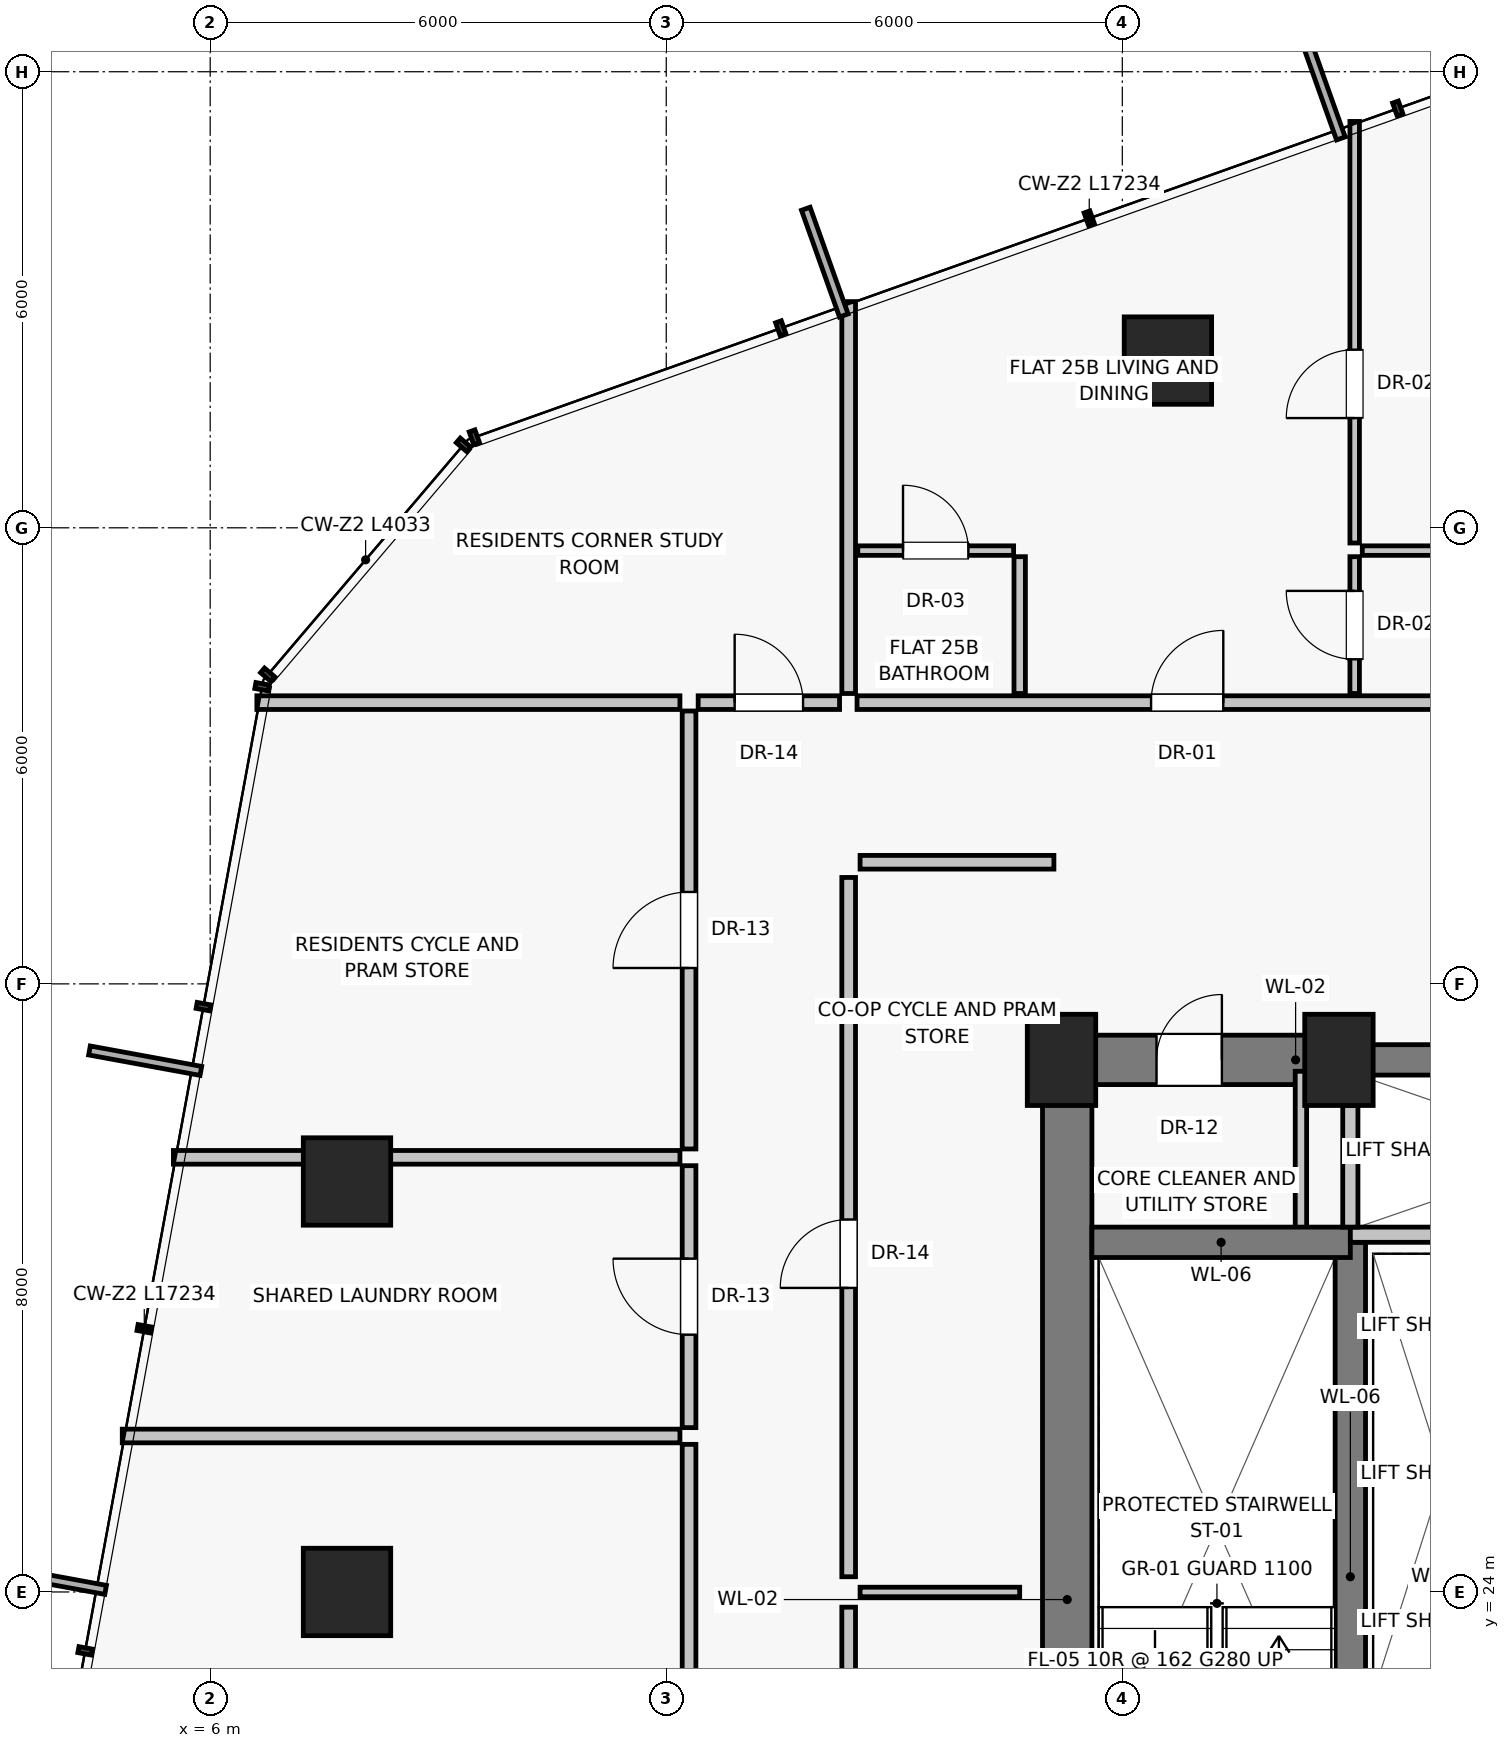
"""IFC4 building model, lengths in metres.
Left out: names, types, materials, properties, quantities, classifications, styles, units other than length and angle.
Written with IfcOpenShell. Run it as: python <this file> out.ifc"""

import sys

from ifc_helpers import new_model, si_unit, direction, frame, frame_2d, origin, origin_2d, place, context, subcontext, project, spatial, rectangle, extrude, source, transform, mapped, element, fill, save


model = new_model("IFC4")
c1 = context("Model", 3, precision=1e-05, world=origin(), true_north=direction((0.0, 1.0)))
c2 = subcontext(c1, "Body", "Model", "MODEL_VIEW")
j1 = project(units=[si_unit("LENGTHUNIT", "METRE"), si_unit("PLANEANGLEUNIT", "RADIAN")], contexts=[c1])
p1 = place(None, origin())
s1 = spatial("IfcSite", under=j1, at=p1, CompositionType="ELEMENT")
p2 = place(p1, origin())
s2 = spatial("IfcBuilding", under=s1, at=p2, CompositionType="ELEMENT")
p3 = place(p2, frame((0.0, 0.0, 92.7)))
s3 = spatial("IfcBuildingStorey", under=s2, at=p3, CompositionType="ELEMENT", Elevation=92.7)
for number, where, z_axis, x_axis in (
    (1, (17.2, 31.0, 0.0), (0.0, 0.0, 1.0), (1.0, 0.0, 0.0)),
    (2, (20.85, 31.0, 0.0), (0.0, 0.0, 1.0), (1.0, 0.0, 0.0)),
):
    element("IfcColumn", number, at=place(p3, frame(where, z_axis=z_axis, x_axis=x_axis)), inside=s3, PredefinedType="PILASTER", context=c2, shape_type="SweptSolid", body=[
        extrude(rectangle(XDim=0.9, YDim=1.2, at=origin_2d()), origin(), (0.0, 0.0, 1.0), 3.25),
    ])
for number, where, z_axis, x_axis in (
    (3, (18.6, 40.2, 0.0), (0.0, 0.0, 1.0), (1.0, 0.0, 0.0)),
    (4, (7.8, 29.4, 0.0), (0.0, 0.0, 1.0), (1.0, 0.0, 0.0)),
    (5, (7.8, 24.0, 0.0), (0.0, 0.0, 1.0), (1.0, 0.0, 0.0)),
):
    element("IfcColumn", number, at=place(p3, frame(where, z_axis=z_axis, x_axis=x_axis)), inside=s3, PredefinedType="COLUMN", context=c2, shape_type="SweptSolid", body=[
        extrude(rectangle(XDim=1.15, YDim=1.15, at=origin_2d()), origin(), (0.0, 0.0, 1.0), 3.25),
    ])
p4 = place(p3, frame((17.275, 16.8, 0.0), z_axis=(0.0, 0.0, 1.0), x_axis=(0.0, 1.0, 0.0)))
e6 = element("IfcWall", 6, at=p4, inside=s3, PredefinedType="SHEAR", context=c2, shape_type="SweptSolid", body=[
    extrude(rectangle(XDim=14.2, YDim=0.65, at=frame_2d((7.1, 0.0))), origin(), (0.0, 0.0, 1.0), 3.0),
])
p5 = place(p3, frame((17.2, 31.0, 0.0), z_axis=(0.0, 0.0, 1.0), x_axis=(1.0, 0.0, 0.0)))
e7 = element("IfcWall", 7, at=p5, inside=s3, PredefinedType="SHEAR", context=c2, shape_type="SweptSolid", body=[
    extrude(rectangle(XDim=3.8, YDim=0.65, at=frame_2d((1.9, 0.0))), origin(), (0.0, 0.0, 1.0), 3.0),
])
p6 = place(p5, frame((1.25, 0.0, 0.0)))
e8 = element("IfcOpeningElement", 8, at=p6, cuts=e7, PredefinedType="OPENING", context=c2, shape_type="SweptSolid", body=[
    extrude(rectangle(XDim=0.86, YDim=2.01, at=frame_2d((0.43, 1.005))), frame((0.0, 0.335, 0.0), z_axis=(0.0, -1.0, 0.0), x_axis=(1.0, 0.0, 0.0)), (0.0, 0.0, 1.0), 0.67),
])
p7 = place(p3, frame((21.0, 31.0, 0.0), z_axis=(0.0, 0.0, 1.0), x_axis=(1.0, 0.0, 0.0)))
e9 = element("IfcWall", 9, at=p7, inside=s3, PredefinedType="SHEAR", context=c2, shape_type="SweptSolid", body=[
    extrude(rectangle(XDim=6.0, YDim=0.4, at=frame_2d((3.0, 0.0))), origin(), (0.0, 0.0, 1.0), 3.0),
])
p8 = place(p3, frame((20.35, 28.65, 0.0), z_axis=(0.0, 0.0, 1.0), x_axis=(0.0, 1.0, 0.0)))
e10 = element("IfcWall", 10, at=p8, inside=s3, PredefinedType="PARTITIONING", context=c2, shape_type="SweptSolid", body=[
    extrude(rectangle(XDim=2.2, YDim=0.15, at=frame_2d((1.1, 0.0))), origin(), (0.0, 0.0, 1.0), 3.0),
])
p9 = place(p3, frame((21.0, 19.8, 0.0), z_axis=(0.0, 0.0, 1.0), x_axis=(0.0, 1.0, 0.0)))
e11 = element("IfcWall", 11, at=p9, inside=s3, PredefinedType="SHEAR", context=c2, shape_type="SweptSolid", body=[
    extrude(rectangle(XDim=8.8, YDim=0.4, at=frame_2d((4.4, 0.0))), origin(), (0.0, 0.0, 1.0), 3.0),
])
p10 = place(p3, frame((17.6, 28.6, 0.0), z_axis=(0.0, 0.0, 1.0), x_axis=(1.0, 0.0, 0.0)))
e12 = element("IfcWall", 12, at=p10, inside=s3, PredefinedType="SHEAR", context=c2, shape_type="SweptSolid", body=[
    extrude(rectangle(XDim=3.4, YDim=0.4, at=frame_2d((1.7, 0.0))), origin(), (0.0, 0.0, 1.0), 3.0),
])
p11 = place(p3, frame((21.0, 28.7, 0.0), z_axis=(0.0, 0.0, 1.0), x_axis=(1.0, 0.0, 0.0)))
e13 = element("IfcWall", 13, at=p11, inside=s3, PredefinedType="SOLIDWALL", context=c2, shape_type="SweptSolid", body=[
    extrude(rectangle(XDim=6.0, YDim=0.2, at=frame_2d((3.0, 0.0))), origin(), (0.0, 0.0, 1.0), 3.0),
])
p12 = place(p3, frame((21.0, 28.8, 0.0), z_axis=(0.0, 0.0, 1.0), x_axis=(0.0, 1.0, 0.0)))
e14 = element("IfcWall", 14, at=p12, inside=s3, PredefinedType="SOLIDWALL", context=c2, shape_type="SweptSolid", body=[
    extrude(rectangle(XDim=1.6, YDim=0.2, at=frame_2d((0.8, 0.0))), origin(), (0.0, 0.0, 1.0), 3.0),
])
p13 = place(p3, frame((14.4, 14.4, 0.0), z_axis=(0.0, 0.0, 1.0), x_axis=(0.0, 1.0, 0.0)))
e15 = element("IfcWall", 15, at=p13, inside=s3, PredefinedType="PARTITIONING", context=c2, shape_type="SweptSolid", body=[
    extrude(rectangle(XDim=9.4, YDim=0.18, at=frame_2d((4.7, 0.0))), origin(), (0.0, 0.0, 1.0), 3.0),
])
p14 = place(p13, frame((3.8, 0.0, 0.0)))
e16 = element("IfcOpeningElement", 16, at=p14, cuts=e15, PredefinedType="OPENING", context=c2, shape_type="SweptSolid", body=[
    extrude(rectangle(XDim=0.9, YDim=2.01, at=frame_2d((0.45, 1.005))), frame((0.0, 0.1, 0.0), z_axis=(0.0, -1.0, 0.0), x_axis=(1.0, 0.0, 0.0)), (0.0, 0.0, 1.0), 0.2),
])
p15 = place(p3, frame((14.4, 24.2, 0.0), z_axis=(0.0, 0.0, 1.0), x_axis=(0.0, 1.0, 0.0)))
e17 = element("IfcWall", 17, at=p15, inside=s3, PredefinedType="PARTITIONING", context=c2, shape_type="SweptSolid", body=[
    extrude(rectangle(XDim=9.2, YDim=0.18, at=frame_2d((4.6, 0.0))), origin(), (0.0, 0.0, 1.0), 3.0),
])
p16 = place(p15, frame((3.8, 0.0, 0.0)))
e18 = element("IfcOpeningElement", 18, at=p16, cuts=e17, PredefinedType="OPENING", context=c2, shape_type="SweptSolid", body=[
    extrude(rectangle(XDim=0.9, YDim=2.01, at=frame_2d((0.45, 1.005))), frame((0.0, 0.1, 0.0), z_axis=(0.0, -1.0, 0.0), x_axis=(1.0, 0.0, 0.0)), (0.0, 0.0, 1.0), 0.2),
])
p17 = place(p3, frame((14.55, 24.0, 0.0), z_axis=(0.0, 0.0, 1.0), x_axis=(1.0, 0.0, 0.0)))
e19 = element("IfcWall", 19, at=p17, inside=s3, PredefinedType="PARTITIONING", context=c2, shape_type="SweptSolid", body=[
    extrude(rectangle(XDim=2.1, YDim=0.125, at=frame_2d((1.05, 0.0))), origin(), (0.0, 0.0, 1.0), 3.0),
])
p18 = place(p3, frame((14.55, 33.6, 0.0), z_axis=(0.0, 0.0, 1.0), x_axis=(1.0, 0.0, 0.0)))
e20 = element("IfcWall", 20, at=p18, inside=s3, PredefinedType="PARTITIONING", context=c2, shape_type="SweptSolid", body=[
    extrude(rectangle(XDim=2.55, YDim=0.18, at=frame_2d((1.275, 0.0))), origin(), (0.0, 0.0, 1.0), 3.0),
])
p19 = place(p3, frame((14.4, 35.82, 0.0), z_axis=(0.0, 0.0, 1.0), x_axis=(0.0, 1.0, 0.0)))
e21 = element("IfcWall", 21, at=p19, inside=s3, PredefinedType="PARTITIONING", context=c2, shape_type="SweptSolid", body=[
    extrude(rectangle(XDim=5.156, YDim=0.18, at=frame_2d((2.578, 0.0))), origin(), (0.0, 0.0, 1.0), 3.0),
])
p20 = place(p3, frame((14.51, 35.7, 0.0), z_axis=(0.0, 0.0, 1.0), x_axis=(1.0, 0.0, 0.0)))
e22 = element("IfcWall", 22, at=p20, inside=s3, PredefinedType="PARTITIONING", context=c2, shape_type="SweptSolid", body=[
    extrude(rectangle(XDim=11.884, YDim=0.18, at=frame_2d((5.942, 0.0))), origin(), (0.0, 0.0, 1.0), 2.58),
])
p21 = place(p20, frame((3.868, 0.0, 0.0)))
e23 = element("IfcOpeningElement", 23, at=p21, cuts=e22, PredefinedType="OPENING", context=c2, shape_type="SweptSolid", body=[
    extrude(rectangle(XDim=0.95, YDim=2.02, at=frame_2d((0.475, 1.01))), frame((0.0, 0.1, 0.0), z_axis=(0.0, -1.0, 0.0), x_axis=(1.0, 0.0, 0.0)), (0.0, 0.0, 1.0), 0.2),
])
p22 = place(p3, frame((16.65, 35.82, 0.0), z_axis=(0.0, 0.0, 1.0), x_axis=(0.0, 1.0, 0.0)))
e24 = element("IfcWall", 24, at=p22, inside=s3, PredefinedType="PARTITIONING", context=c2, shape_type="SweptSolid", body=[
    extrude(rectangle(XDim=1.8, YDim=0.15, at=frame_2d((0.9, 0.0))), origin(), (0.0, 0.0, 1.0), 3.0),
])
p23 = place(p3, frame((14.52, 37.7, 0.0), z_axis=(0.0, 0.0, 1.0), x_axis=(1.0, 0.0, 0.0)))
e25 = element("IfcWall", 25, at=p23, inside=s3, PredefinedType="PARTITIONING", context=c2, shape_type="SweptSolid", body=[
    extrude(rectangle(XDim=2.05, YDim=0.125, at=frame_2d((1.025, 0.0))), origin(), (0.0, 0.0, 1.0), 3.0),
])
p24 = place(p23, frame((0.595, 0.0, 0.0)))
e26 = element("IfcOpeningElement", 26, at=p24, cuts=e25, PredefinedType="OPENING", context=c2, shape_type="SweptSolid", body=[
    extrude(rectangle(XDim=0.86, YDim=2.01, at=frame_2d((0.43, 1.005))), frame((0.0, 0.073, 0.0), z_axis=(0.0, -1.0, 0.0), x_axis=(1.0, 0.0, 0.0)), (0.0, 0.0, 1.0), 0.145),
])
p25 = place(p3, frame((21.057, 35.82, 0.0), z_axis=(0.0, 0.0, 1.0), x_axis=(0.0, 1.0, 0.0)))
e27 = element("IfcWall", 27, at=p25, inside=s3, PredefinedType="PARTITIONING", context=c2, shape_type="SweptSolid", body=[
    extrude(rectangle(XDim=1.8, YDim=0.125, at=frame_2d((0.9, 0.0))), origin(), (0.0, 0.0, 1.0), 3.0),
])
p26 = place(p25, frame((0.45, 0.0, 0.0)))
e28 = element("IfcOpeningElement", 28, at=p26, cuts=e27, PredefinedType="OPENING", context=c2, shape_type="SweptSolid", body=[
    extrude(rectangle(XDim=0.9, YDim=2.01, at=frame_2d((0.45, 1.005))), frame((0.0, 0.073, 0.0), z_axis=(0.0, -1.0, 0.0), x_axis=(1.0, 0.0, 0.0)), (0.0, 0.0, 1.0), 0.145),
])
p27 = place(p3, frame((21.157, 37.7, 0.0), z_axis=(0.0, 0.0, 1.0), x_axis=(1.0, 0.0, 0.0)))
e29 = element("IfcWall", 29, at=p27, inside=s3, PredefinedType="PARTITIONING", context=c2, shape_type="SweptSolid", body=[
    extrude(rectangle(XDim=5.227, YDim=0.125, at=frame_2d((2.614, 0.0))), origin(), (0.0, 0.0, 1.0), 3.0),
])
p28 = place(p3, frame((21.057, 37.8, 0.0), z_axis=(0.0, 0.0, 1.0), x_axis=(0.0, 1.0, 0.0)))
e30 = element("IfcWall", 30, at=p28, inside=s3, PredefinedType="PARTITIONING", context=c2, shape_type="SweptSolid", body=[
    extrude(rectangle(XDim=5.546, YDim=0.125, at=frame_2d((2.773, 0.0))), origin(), (0.0, 0.0, 1.0), 3.0),
])
p29 = place(p28, frame((1.644, 0.0, 0.0)))
e31 = element("IfcOpeningElement", 31, at=p29, cuts=e30, PredefinedType="OPENING", context=c2, shape_type="SweptSolid", body=[
    extrude(rectangle(XDim=0.9, YDim=2.01, at=frame_2d((0.45, 1.005))), frame((0.0, 0.073, 0.0), z_axis=(0.0, -1.0, 0.0), x_axis=(1.0, 0.0, 0.0)), (0.0, 0.0, 1.0), 0.145),
])
p30 = place(p3, frame((12.18, 35.7, 0.0), z_axis=(0.0, 0.0, 1.0), x_axis=(-1.0, 0.0, 0.0)))
e32 = element("IfcWall", 32, at=p30, inside=s3, PredefinedType="PARTITIONING", context=c2, shape_type="SweptSolid", body=[
    extrude(rectangle(XDim=5.566, YDim=0.18, at=frame_2d((2.783, 0.0))), origin(), (0.0, 0.0, 1.0), 3.0),
])
p31 = place(p3, frame((12.3, 17.512, 0.0), z_axis=(0.0, 0.0, 1.0), x_axis=(0.0, 1.0, 0.0)))
e33 = element("IfcWall", 33, at=p31, inside=s3, PredefinedType="PARTITIONING", context=c2, shape_type="SweptSolid", body=[
    extrude(rectangle(XDim=8.43, YDim=0.18, at=frame_2d((4.215, 0.0))), origin(), (0.0, 0.0, 1.0), 2.58),
])
p32 = place(p31, frame((3.715, 0.0, 0.0)))
e34 = element("IfcOpeningElement", 34, at=p32, cuts=e33, PredefinedType="OPENING", context=c2, shape_type="SweptSolid", body=[
    extrude(rectangle(XDim=1.0, YDim=2.01, at=frame_2d((0.5, 1.005))), frame((0.0, 0.1, 0.0), z_axis=(0.0, -1.0, 0.0), x_axis=(1.0, 0.0, 0.0)), (0.0, 0.0, 1.0), 0.2),
])
p33 = place(p3, frame((12.18, 26.052, 0.0), z_axis=(0.0, 0.0, 1.0), x_axis=(-1.0, 0.0, 0.0)))
e35 = element("IfcWall", 35, at=p33, inside=s3, PredefinedType="PARTITIONING", context=c2, shape_type="SweptSolid", body=[
    extrude(rectangle(XDim=7.337, YDim=0.18, at=frame_2d((3.668, 0.0))), origin(), (0.0, 0.0, 1.0), 3.0),
])
p34 = place(p3, frame((12.3, 26.162, 0.0), z_axis=(0.0, 0.0, 1.0), x_axis=(0.0, 1.0, 0.0)))
e36 = element("IfcWall", 36, at=p34, inside=s3, PredefinedType="PARTITIONING", context=c2, shape_type="SweptSolid", body=[
    extrude(rectangle(XDim=3.446, YDim=0.18, at=frame_2d((1.723, 0.0))), origin(), (0.0, 0.0, 1.0), 2.58),
])
p35 = place(p34, frame((1.223, 0.0, 0.0)))
e37 = element("IfcOpeningElement", 37, at=p35, cuts=e36, PredefinedType="OPENING", context=c2, shape_type="SweptSolid", body=[
    extrude(rectangle(XDim=1.0, YDim=2.01, at=frame_2d((0.5, 1.005))), frame((0.0, 0.1, 0.0), z_axis=(0.0, -1.0, 0.0), x_axis=(1.0, 0.0, 0.0)), (0.0, 0.0, 1.0), 0.2),
])
p36 = place(p3, frame((12.3, 29.828, 0.0), z_axis=(0.0, 0.0, 1.0), x_axis=(0.0, 1.0, 0.0)))
e38 = element("IfcWall", 38, at=p36, inside=s3, PredefinedType="PARTITIONING", context=c2, shape_type="SweptSolid", body=[
    extrude(rectangle(XDim=5.762, YDim=0.18, at=frame_2d((2.881, 0.0))), origin(), (0.0, 0.0, 1.0), 2.58),
])
p37 = place(p36, frame((2.381, 0.0, 0.0)))
e39 = element("IfcOpeningElement", 39, at=p37, cuts=e38, PredefinedType="OPENING", context=c2, shape_type="SweptSolid", body=[
    extrude(rectangle(XDim=1.0, YDim=2.01, at=frame_2d((0.5, 1.005))), frame((0.0, 0.1, 0.0), z_axis=(0.0, -1.0, 0.0), x_axis=(1.0, 0.0, 0.0)), (0.0, 0.0, 1.0), 0.2),
])
p38 = place(p3, frame((12.18, 29.718, 0.0), z_axis=(0.0, 0.0, 1.0), x_axis=(-1.0, 0.0, 0.0)))
e40 = element("IfcWall", 40, at=p38, inside=s3, PredefinedType="PARTITIONING", context=c2, shape_type="SweptSolid", body=[
    extrude(rectangle(XDim=6.664, YDim=0.18, at=frame_2d((3.332, 0.0))), origin(), (0.0, 0.0, 1.0), 2.378),
])
p39 = place(p3, frame((12.42, 35.7, 0.0), z_axis=(0.0, 0.0, 1.0), x_axis=(1.0, 0.0, 0.0)))
e41 = element("IfcWall", 41, at=p39, inside=s3, PredefinedType="PARTITIONING", context=c2, shape_type="SweptSolid", body=[
    extrude(rectangle(XDim=1.86, YDim=0.18, at=frame_2d((0.93, 0.0))), origin(), (0.0, 0.0, 1.0), 3.0),
])
p40 = place(p39, frame((0.48, 0.0, 0.0)))
e42 = element("IfcOpeningElement", 42, at=p40, cuts=e41, PredefinedType="OPENING", context=c2, shape_type="SweptSolid", body=[
    extrude(rectangle(XDim=0.9, YDim=2.01, at=frame_2d((0.45, 1.005))), frame((0.0, 0.1, 0.0), z_axis=(0.0, -1.0, 0.0), x_axis=(1.0, 0.0, 0.0)), (0.0, 0.0, 1.0), 0.2),
])
m1 = source(origin(), c2, "Body", "SweptSolid", [
    extrude(rectangle(XDim=0.86, YDim=2.01, at=frame_2d((0.43, 1.005))), frame((0.0, 0.025, 0.0), z_axis=(0.0, -1.0, 0.0), x_axis=(1.0, 0.0, 0.0)), (0.0, 0.0, 1.0), 0.05),
])
p41 = place(p6, origin())
e43 = element("IfcDoor", 43, at=p41, inside=s3, OperationType="SINGLE_SWING_RIGHT", PredefinedType="DOOR", context=c2, shape_type="MappedRepresentation", body=[
    mapped(m1, transform((0.0, 0.0, 0.0), scale=1.0)),
])
fill(e8, e43)
m2 = source(origin(), c2, "Body", "SweptSolid", [
    extrude(rectangle(XDim=0.9, YDim=2.01, at=frame_2d((0.45, 1.005))), frame((0.0, 0.025, 0.0), z_axis=(0.0, -1.0, 0.0), x_axis=(1.0, 0.0, 0.0)), (0.0, 0.0, 1.0), 0.05),
])
p42 = place(p16, origin())
e44 = element("IfcDoor", 44, at=p42, inside=s3, OperationType="SINGLE_SWING_LEFT", PredefinedType="DOOR", context=c2, shape_type="MappedRepresentation", body=[
    mapped(m2, transform((0.0, 0.0, 0.0), scale=1.0)),
])
fill(e18, e44)
m3 = source(origin(), c2, "Body", "SweptSolid", [
    extrude(rectangle(XDim=0.95, YDim=2.02, at=frame_2d((0.475, 1.01))), frame((0.0, 0.025, 0.0), z_axis=(0.0, -1.0, 0.0), x_axis=(1.0, 0.0, 0.0)), (0.0, 0.0, 1.0), 0.05),
])
p43 = place(p21, origin())
e45 = element("IfcDoor", 45, at=p43, inside=s3, OperationType="SINGLE_SWING_RIGHT", PredefinedType="DOOR", context=c2, shape_type="MappedRepresentation", body=[
    mapped(m3, transform((0.0, 0.0, 0.0), scale=1.0)),
])
fill(e23, e45)
p44 = place(p24, origin())
e46 = element("IfcDoor", 46, at=p44, inside=s3, OperationType="SINGLE_SWING_LEFT", PredefinedType="DOOR", context=c2, shape_type="MappedRepresentation", body=[
    mapped(m1, transform((0.0, 0.0, 0.0), scale=1.0)),
])
fill(e26, e46)
p45 = place(p26, origin())
e47 = element("IfcDoor", 47, at=p45, inside=s3, OperationType="SINGLE_SWING_RIGHT", PredefinedType="DOOR", context=c2, shape_type="MappedRepresentation", body=[
    mapped(m2, transform((0.0, 0.0, 0.0), scale=1.0)),
])
fill(e28, e47)
p46 = place(p29, origin())
e48 = element("IfcDoor", 48, at=p46, inside=s3, OperationType="SINGLE_SWING_LEFT", PredefinedType="DOOR", context=c2, shape_type="MappedRepresentation", body=[
    mapped(m2, transform((0.0, 0.0, 0.0), scale=1.0)),
])
fill(e31, e48)
m4 = source(origin(), c2, "Body", "SweptSolid", [
    extrude(rectangle(XDim=1.0, YDim=2.01, at=frame_2d((0.5, 1.005))), frame((0.0, 0.025, 0.0), z_axis=(0.0, -1.0, 0.0), x_axis=(1.0, 0.0, 0.0)), (0.0, 0.0, 1.0), 0.05),
])
p47 = place(p35, origin())
e49 = element("IfcDoor", 49, at=p47, inside=s3, OperationType="SINGLE_SWING_RIGHT", PredefinedType="DOOR", context=c2, shape_type="MappedRepresentation", body=[
    mapped(m4, transform((0.0, 0.0, 0.0), scale=1.0)),
])
fill(e37, e49)
p48 = place(p37, origin())
e50 = element("IfcDoor", 50, at=p48, inside=s3, OperationType="SINGLE_SWING_LEFT", PredefinedType="DOOR", context=c2, shape_type="MappedRepresentation", body=[
    mapped(m4, transform((0.0, 0.0, 0.0), scale=1.0)),
])
fill(e39, e50)
p49 = place(p40, origin())
e51 = element("IfcDoor", 51, at=p49, inside=s3, OperationType="SINGLE_SWING_LEFT", PredefinedType="DOOR", context=c2, shape_type="MappedRepresentation", body=[
    mapped(m2, transform((0.0, 0.0, 0.0), scale=1.0)),
])
fill(e42, e51)
save(model, sys.argv[1])
